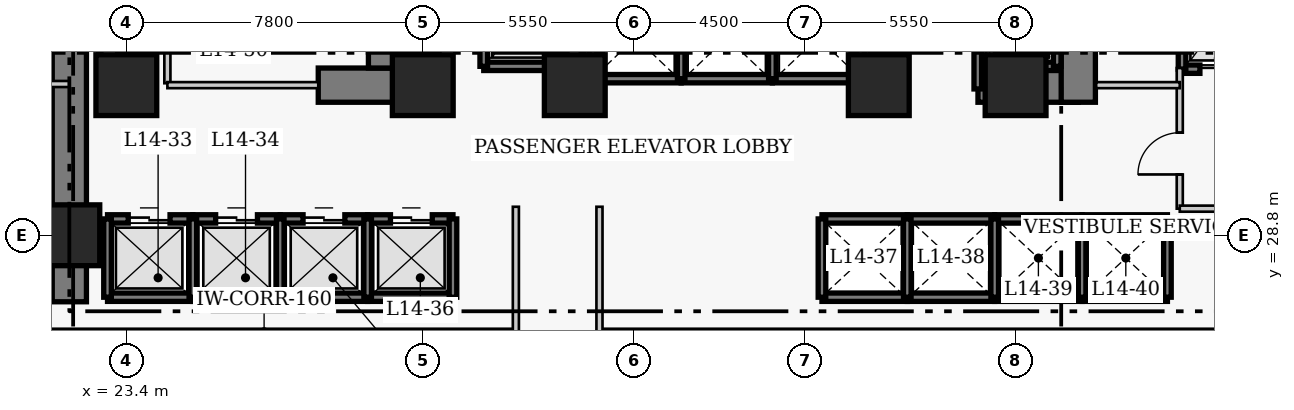
"""IFC4 building model, lengths in metres.
Left out: names, types, materials, properties, quantities, classifications, styles, units other than length and angle.
Written with IfcOpenShell. Run it as: python <this file> out.ifc"""

import sys

from ifc_helpers import new_model, si_unit, direction, frame, frame_2d, origin, origin_2d, place, context, subcontext, project, spatial, rectangle, extrude, element, fill, save


model = new_model("IFC4")
c1 = context("Model", 3, precision=1e-05, world=origin(), true_north=direction((0.0, 1.0)))
c2 = subcontext(c1, "Body", "Model", "MODEL_VIEW")
j1 = project(units=[si_unit("LENGTHUNIT", "METRE"), si_unit("PLANEANGLEUNIT", "RADIAN")], contexts=[c1])
p1 = place(None, origin())
s1 = spatial("IfcSite", under=j1, at=p1, CompositionType="ELEMENT")
p2 = place(p1, origin())
s2 = spatial("IfcBuilding", under=s1, at=p2, CompositionType="ELEMENT")
p3 = place(p2, frame((0.0, 0.0, 60.2)))
s3 = spatial("IfcBuildingStorey", under=s2, at=p3, CompositionType="ELEMENT", Elevation=60.2)
p4 = place(p3, frame((21.9, 27.05, 0.0), z_axis=(0.0, 0.0, 1.0), x_axis=(0.0, 1.0, 0.0)))
e1 = element("IfcWall", 1, at=p4, inside=s3, PredefinedType="SHEAR", context=c2, shape_type="SweptSolid", body=[
    extrude(rectangle(XDim=13.72, YDim=0.9, at=frame_2d((6.86, 0.0))), origin(), (0.0, 0.0, 1.0), 3.8),
])
p5 = place(p3, frame((28.45, 32.75, 0.0), z_axis=(0.0, 0.0, 1.0), x_axis=(1.0, 0.0, 0.0)))
e2 = element("IfcWall", 2, at=p5, inside=s3, PredefinedType="SHEAR", context=c2, shape_type="SweptSolid", body=[
    extrude(rectangle(XDim=2.4, YDim=0.9, at=frame_2d((1.2, 0.0))), origin(), (0.0, 0.0, 1.0), 3.8),
])
p6 = place(p3, frame((45.81, 32.75, 0.0), z_axis=(0.0, 0.0, 1.0), x_axis=(1.0, 0.0, 0.0)))
e3 = element("IfcWall", 3, at=p6, inside=s3, PredefinedType="SHEAR", context=c2, shape_type="SweptSolid", body=[
    extrude(rectangle(XDim=2.64, YDim=0.9, at=frame_2d((1.32, 0.0))), origin(), (0.0, 0.0, 1.0), 3.8),
])
p7 = place(p3, frame((30.22, 33.2, 0.0), z_axis=(0.0, 0.0, 1.0), x_axis=(0.0, 1.0, 0.0)))
e4 = element("IfcWall", 4, at=p7, inside=s3, PredefinedType="SHEAR", context=c2, shape_type="SweptSolid", body=[
    extrude(rectangle(XDim=7.12, YDim=0.9, at=frame_2d((3.56, 0.0))), origin(), (0.0, 0.0, 1.0), 3.8),
])
p8 = place(p3, frame((48.45, 32.3, 0.0), z_axis=(0.0, 0.0, 1.0), x_axis=(0.0, 1.0, 0.0)))
e5 = element("IfcWall", 5, at=p8, inside=s3, PredefinedType="SHEAR", context=c2, shape_type="SweptSolid", body=[
    extrude(rectangle(XDim=8.02, YDim=0.9, at=frame_2d((4.01, 0.0))), origin(), (0.0, 0.0, 1.0), 3.8),
])
p9 = place(p8, frame((5.9, 0.0, 0.0)))
e6 = element("IfcOpeningElement", 6, at=p9, cuts=e5, PredefinedType="OPENING", context=c2, shape_type="SweptSolid", body=[
    extrude(rectangle(XDim=1.1, YDim=2.15, at=frame_2d((0.55, 1.075))), frame((0.0, 0.46, 0.0), z_axis=(0.0, -1.0, 0.0), x_axis=(1.0, 0.0, 0.0)), (0.0, 0.0, 1.0), 0.92),
])
for number, where, z_axis, x_axis in (
    (7, (21.9, 28.8, 0.0), (0.0, 0.0, 1.0), (1.0, 0.0, 0.0)),
    (8, (23.4, 32.75, 0.0), (0.0, 0.0, 1.0), (1.0, 0.0, 0.0)),
    (9, (31.2, 32.75, 0.0), (0.0, 0.0, 1.0), (1.0, 0.0, 0.0)),
    (10, (35.2, 32.75, 0.0), (0.0, 0.0, 1.0), (1.0, 0.0, 0.0)),
    (11, (43.2, 32.75, 0.0), (0.0, 0.0, 1.0), (1.0, 0.0, 0.0)),
    (12, (46.8, 32.75, 0.0), (0.0, 0.0, 1.0), (1.0, 0.0, 0.0)),
):
    element("IfcColumn", number, at=place(p3, frame(where, z_axis=z_axis, x_axis=x_axis)), inside=s3, PredefinedType="COLUMN", context=c2, shape_type="SweptSolid", body=[
        extrude(rectangle(XDim=1.6, YDim=1.6, at=origin_2d()), origin(), (0.0, 0.0, 1.0), 3.8),
    ])
p10 = place(p3, frame((22.905, 29.23, 0.0), z_axis=(0.0, 0.0, 1.0), x_axis=(1.0, 0.0, 0.0)))
e13 = element("IfcWall", 13, at=p10, inside=s3, PredefinedType="SHEAR", context=c2, shape_type="SweptSolid", body=[
    extrude(rectangle(XDim=2.245, YDim=0.22, at=frame_2d((1.123, 0.0))), origin(), (0.0, 0.0, 1.0), 3.8),
])
p11 = place(p10, frame((0.545, 0.0, 0.0)))
e14 = element("IfcOpeningElement", 14, at=p11, cuts=e13, PredefinedType="OPENING", context=c2, shape_type="SweptSolid", body=[
    extrude(rectangle(XDim=1.1, YDim=2.15, at=frame_2d((0.55, 1.075))), frame((0.0, 0.12, 0.0), z_axis=(0.0, -1.0, 0.0), x_axis=(1.0, 0.0, 0.0)), (0.0, 0.0, 1.0), 0.24),
])
p12 = place(p3, frame((22.905, 27.17, 0.0), z_axis=(0.0, 0.0, 1.0), x_axis=(1.0, 0.0, 0.0)))
e15 = element("IfcWall", 15, at=p12, inside=s3, PredefinedType="SHEAR", context=c2, shape_type="SweptSolid", body=[
    extrude(rectangle(XDim=2.245, YDim=0.22, at=frame_2d((1.123, 0.0))), origin(), (0.0, 0.0, 1.0), 3.8),
])
p13 = place(p3, frame((22.905, 27.17, 0.0), z_axis=(0.0, 0.0, 1.0), x_axis=(0.0, 1.0, 0.0)))
e16 = element("IfcWall", 16, at=p13, inside=s3, PredefinedType="SHEAR", context=c2, shape_type="SweptSolid", body=[
    extrude(rectangle(XDim=2.06, YDim=0.2, at=frame_2d((1.03, 0.0))), origin(), (0.0, 0.0, 1.0), 3.8),
])
p14 = place(p3, frame((25.15, 29.23, 0.0), z_axis=(0.0, 0.0, 1.0), x_axis=(1.0, 0.0, 0.0)))
e17 = element("IfcWall", 17, at=p14, inside=s3, PredefinedType="SHEAR", context=c2, shape_type="SweptSolid", body=[
    extrude(rectangle(XDim=2.3, YDim=0.22, at=frame_2d((1.15, 0.0))), origin(), (0.0, 0.0, 1.0), 3.8),
])
p15 = place(p14, frame((0.6, 0.0, 0.0)))
e18 = element("IfcOpeningElement", 18, at=p15, cuts=e17, PredefinedType="OPENING", context=c2, shape_type="SweptSolid", body=[
    extrude(rectangle(XDim=1.1, YDim=2.15, at=frame_2d((0.55, 1.075))), frame((0.0, 0.12, 0.0), z_axis=(0.0, -1.0, 0.0), x_axis=(1.0, 0.0, 0.0)), (0.0, 0.0, 1.0), 0.24),
])
p16 = place(p3, frame((25.15, 27.17, 0.0), z_axis=(0.0, 0.0, 1.0), x_axis=(1.0, 0.0, 0.0)))
e19 = element("IfcWall", 19, at=p16, inside=s3, PredefinedType="SHEAR", context=c2, shape_type="SweptSolid", body=[
    extrude(rectangle(XDim=2.3, YDim=0.22, at=frame_2d((1.15, 0.0))), origin(), (0.0, 0.0, 1.0), 3.8),
])
p17 = place(p3, frame((25.15, 27.17, 0.0), z_axis=(0.0, 0.0, 1.0), x_axis=(0.0, 1.0, 0.0)))
e20 = element("IfcWall", 20, at=p17, inside=s3, PredefinedType="SHEAR", context=c2, shape_type="SweptSolid", body=[
    extrude(rectangle(XDim=2.06, YDim=0.2, at=frame_2d((1.03, 0.0))), origin(), (0.0, 0.0, 1.0), 3.8),
])
p18 = place(p3, frame((27.45, 29.23, 0.0), z_axis=(0.0, 0.0, 1.0), x_axis=(1.0, 0.0, 0.0)))
e21 = element("IfcWall", 21, at=p18, inside=s3, PredefinedType="SHEAR", context=c2, shape_type="SweptSolid", body=[
    extrude(rectangle(XDim=2.3, YDim=0.22, at=frame_2d((1.15, 0.0))), origin(), (0.0, 0.0, 1.0), 3.8),
])
p19 = place(p18, frame((0.6, 0.0, 0.0)))
e22 = element("IfcOpeningElement", 22, at=p19, cuts=e21, PredefinedType="OPENING", context=c2, shape_type="SweptSolid", body=[
    extrude(rectangle(XDim=1.1, YDim=2.15, at=frame_2d((0.55, 1.075))), frame((0.0, 0.12, 0.0), z_axis=(0.0, -1.0, 0.0), x_axis=(1.0, 0.0, 0.0)), (0.0, 0.0, 1.0), 0.24),
])
p20 = place(p3, frame((27.45, 27.17, 0.0), z_axis=(0.0, 0.0, 1.0), x_axis=(1.0, 0.0, 0.0)))
e23 = element("IfcWall", 23, at=p20, inside=s3, PredefinedType="SHEAR", context=c2, shape_type="SweptSolid", body=[
    extrude(rectangle(XDim=2.3, YDim=0.22, at=frame_2d((1.15, 0.0))), origin(), (0.0, 0.0, 1.0), 3.8),
])
p21 = place(p3, frame((27.45, 27.17, 0.0), z_axis=(0.0, 0.0, 1.0), x_axis=(0.0, 1.0, 0.0)))
e24 = element("IfcWall", 24, at=p21, inside=s3, PredefinedType="SHEAR", context=c2, shape_type="SweptSolid", body=[
    extrude(rectangle(XDim=2.06, YDim=0.2, at=frame_2d((1.03, 0.0))), origin(), (0.0, 0.0, 1.0), 3.8),
])
p22 = place(p3, frame((29.75, 29.23, 0.0), z_axis=(0.0, 0.0, 1.0), x_axis=(1.0, 0.0, 0.0)))
e25 = element("IfcWall", 25, at=p22, inside=s3, PredefinedType="SHEAR", context=c2, shape_type="SweptSolid", body=[
    extrude(rectangle(XDim=2.245, YDim=0.22, at=frame_2d((1.123, 0.0))), origin(), (0.0, 0.0, 1.0), 3.8),
])
p23 = place(p22, frame((0.6, 0.0, 0.0)))
e26 = element("IfcOpeningElement", 26, at=p23, cuts=e25, PredefinedType="OPENING", context=c2, shape_type="SweptSolid", body=[
    extrude(rectangle(XDim=1.1, YDim=2.15, at=frame_2d((0.55, 1.075))), frame((0.0, 0.12, 0.0), z_axis=(0.0, -1.0, 0.0), x_axis=(1.0, 0.0, 0.0)), (0.0, 0.0, 1.0), 0.24),
])
p24 = place(p3, frame((29.75, 27.17, 0.0), z_axis=(0.0, 0.0, 1.0), x_axis=(1.0, 0.0, 0.0)))
e27 = element("IfcWall", 27, at=p24, inside=s3, PredefinedType="SHEAR", context=c2, shape_type="SweptSolid", body=[
    extrude(rectangle(XDim=2.245, YDim=0.22, at=frame_2d((1.123, 0.0))), origin(), (0.0, 0.0, 1.0), 3.8),
])
for number, where, z_axis, x_axis in (
    (28, (29.75, 27.17, 0.0), (0.0, 0.0, 1.0), (0.0, 1.0, 0.0)),
    (29, (31.995, 27.17, 0.0), (0.0, 0.0, 1.0), (0.0, 1.0, 0.0)),
):
    element("IfcWall", number, at=place(p3, frame(where, z_axis=z_axis, x_axis=x_axis)), inside=s3, PredefinedType="SHEAR", context=c2, shape_type="SweptSolid", body=[
        extrude(rectangle(XDim=2.06, YDim=0.2, at=frame_2d((1.03, 0.0))), origin(), (0.0, 0.0, 1.0), 3.8),
    ])
for number, where, z_axis, x_axis in (
    (30, (41.705, 29.23, 0.0), (0.0, 0.0, 1.0), (1.0, 0.0, 0.0)),
    (31, (41.705, 27.17, 0.0), (0.0, 0.0, 1.0), (1.0, 0.0, 0.0)),
):
    element("IfcWall", number, at=place(p3, frame(where, z_axis=z_axis, x_axis=x_axis)), inside=s3, PredefinedType="SHEAR", context=c2, shape_type="SweptSolid", body=[
        extrude(rectangle(XDim=2.245, YDim=0.22, at=frame_2d((1.123, 0.0))), origin(), (0.0, 0.0, 1.0), 3.8),
    ])
p25 = place(p3, frame((41.705, 27.17, 0.0), z_axis=(0.0, 0.0, 1.0), x_axis=(0.0, 1.0, 0.0)))
e32 = element("IfcWall", 32, at=p25, inside=s3, PredefinedType="SHEAR", context=c2, shape_type="SweptSolid", body=[
    extrude(rectangle(XDim=2.06, YDim=0.2, at=frame_2d((1.03, 0.0))), origin(), (0.0, 0.0, 1.0), 3.8),
])
for number, where, z_axis, x_axis in (
    (33, (43.95, 29.23, 0.0), (0.0, 0.0, 1.0), (1.0, 0.0, 0.0)),
    (34, (43.95, 27.17, 0.0), (0.0, 0.0, 1.0), (1.0, 0.0, 0.0)),
):
    element("IfcWall", number, at=place(p3, frame(where, z_axis=z_axis, x_axis=x_axis)), inside=s3, PredefinedType="SHEAR", context=c2, shape_type="SweptSolid", body=[
        extrude(rectangle(XDim=2.3, YDim=0.22, at=frame_2d((1.15, 0.0))), origin(), (0.0, 0.0, 1.0), 3.8),
    ])
p26 = place(p3, frame((43.95, 27.17, 0.0), z_axis=(0.0, 0.0, 1.0), x_axis=(0.0, 1.0, 0.0)))
e35 = element("IfcWall", 35, at=p26, inside=s3, PredefinedType="SHEAR", context=c2, shape_type="SweptSolid", body=[
    extrude(rectangle(XDim=2.06, YDim=0.2, at=frame_2d((1.03, 0.0))), origin(), (0.0, 0.0, 1.0), 3.8),
])
for number, where, z_axis, x_axis in (
    (36, (46.25, 29.23, 0.0), (0.0, 0.0, 1.0), (1.0, 0.0, 0.0)),
    (37, (46.25, 27.17, 0.0), (0.0, 0.0, 1.0), (1.0, 0.0, 0.0)),
):
    element("IfcWall", number, at=place(p3, frame(where, z_axis=z_axis, x_axis=x_axis)), inside=s3, PredefinedType="SHEAR", context=c2, shape_type="SweptSolid", body=[
        extrude(rectangle(XDim=2.3, YDim=0.22, at=frame_2d((1.15, 0.0))), origin(), (0.0, 0.0, 1.0), 3.8),
    ])
p27 = place(p3, frame((46.25, 27.17, 0.0), z_axis=(0.0, 0.0, 1.0), x_axis=(0.0, 1.0, 0.0)))
e38 = element("IfcWall", 38, at=p27, inside=s3, PredefinedType="SHEAR", context=c2, shape_type="SweptSolid", body=[
    extrude(rectangle(XDim=2.06, YDim=0.2, at=frame_2d((1.03, 0.0))), origin(), (0.0, 0.0, 1.0), 3.8),
])
for number, where, z_axis, x_axis in (
    (39, (48.55, 29.23, 0.0), (0.0, 0.0, 1.0), (1.0, 0.0, 0.0)),
    (40, (48.55, 27.17, 0.0), (0.0, 0.0, 1.0), (1.0, 0.0, 0.0)),
):
    element("IfcWall", number, at=place(p3, frame(where, z_axis=z_axis, x_axis=x_axis)), inside=s3, PredefinedType="SHEAR", context=c2, shape_type="SweptSolid", body=[
        extrude(rectangle(XDim=2.245, YDim=0.22, at=frame_2d((1.123, 0.0))), origin(), (0.0, 0.0, 1.0), 3.8),
    ])
for number, where, z_axis, x_axis in (
    (41, (48.55, 27.17, 0.0), (0.0, 0.0, 1.0), (0.0, 1.0, 0.0)),
    (42, (50.795, 27.17, 0.0), (0.0, 0.0, 1.0), (0.0, 1.0, 0.0)),
):
    element("IfcWall", number, at=place(p3, frame(where, z_axis=z_axis, x_axis=x_axis)), inside=s3, PredefinedType="SHEAR", context=c2, shape_type="SweptSolid", body=[
        extrude(rectangle(XDim=2.06, YDim=0.2, at=frame_2d((1.03, 0.0))), origin(), (0.0, 0.0, 1.0), 3.8),
    ])
p28 = place(p3, frame((35.68, 32.92, 0.0), z_axis=(0.0, 0.0, 1.0), x_axis=(1.0, 0.0, 0.0)))
e43 = element("IfcWall", 43, at=p28, inside=s3, PredefinedType="SHEAR", context=c2, shape_type="SweptSolid", body=[
    extrude(rectangle(XDim=2.32, YDim=0.22, at=frame_2d((1.16, 0.0))), origin(), (0.0, 0.0, 1.0), 3.8),
])
p29 = place(p3, frame((35.68, 32.92, 0.0), z_axis=(0.0, 0.0, 1.0), x_axis=(0.0, 1.0, 0.0)))
e44 = element("IfcWall", 44, at=p29, inside=s3, PredefinedType="SHEAR", context=c2, shape_type="SweptSolid", body=[
    extrude(rectangle(XDim=2.16, YDim=0.2, at=frame_2d((1.08, 0.0))), origin(), (0.0, 0.0, 1.0), 3.8),
])
p30 = place(p3, frame((38.0, 32.92, 0.0), z_axis=(0.0, 0.0, 1.0), x_axis=(1.0, 0.0, 0.0)))
e45 = element("IfcWall", 45, at=p30, inside=s3, PredefinedType="SHEAR", context=c2, shape_type="SweptSolid", body=[
    extrude(rectangle(XDim=2.4, YDim=0.22, at=frame_2d((1.2, 0.0))), origin(), (0.0, 0.0, 1.0), 3.8),
])
p31 = place(p3, frame((38.0, 32.92, 0.0), z_axis=(0.0, 0.0, 1.0), x_axis=(0.0, 1.0, 0.0)))
e46 = element("IfcWall", 46, at=p31, inside=s3, PredefinedType="SHEAR", context=c2, shape_type="SweptSolid", body=[
    extrude(rectangle(XDim=2.16, YDim=0.2, at=frame_2d((1.08, 0.0))), origin(), (0.0, 0.0, 1.0), 3.8),
])
p32 = place(p3, frame((40.4, 32.92, 0.0), z_axis=(0.0, 0.0, 1.0), x_axis=(1.0, 0.0, 0.0)))
e47 = element("IfcWall", 47, at=p32, inside=s3, PredefinedType="SHEAR", context=c2, shape_type="SweptSolid", body=[
    extrude(rectangle(XDim=2.32, YDim=0.22, at=frame_2d((1.16, 0.0))), origin(), (0.0, 0.0, 1.0), 3.8),
])
for number, where, z_axis, x_axis in (
    (48, (40.4, 32.92, 0.0), (0.0, 0.0, 1.0), (0.0, 1.0, 0.0)),
    (49, (42.72, 32.92, 0.0), (0.0, 0.0, 1.0), (0.0, 1.0, 0.0)),
):
    element("IfcWall", number, at=place(p3, frame(where, z_axis=z_axis, x_axis=x_axis)), inside=s3, PredefinedType="SHEAR", context=c2, shape_type="SweptSolid", body=[
        extrude(rectangle(XDim=2.16, YDim=0.2, at=frame_2d((1.08, 0.0))), origin(), (0.0, 0.0, 1.0), 3.8),
    ])
p33 = place(p3, frame((51.18, 33.17, 0.0), z_axis=(0.0, 0.0, 1.0), x_axis=(1.0, 0.0, 0.0)))
e50 = element("IfcWall", 50, at=p33, inside=s3, PredefinedType="SHEAR", context=c2, shape_type="SweptSolid", body=[
    extrude(rectangle(XDim=2.42, YDim=0.22, at=frame_2d((1.21, 0.0))), origin(), (0.0, 0.0, 1.0), 3.8),
])
p34 = place(p33, frame((0.47, 0.0, 0.0)))
e51 = element("IfcOpeningElement", 51, at=p34, cuts=e50, PredefinedType="OPENING", context=c2, shape_type="SweptSolid", body=[
    extrude(rectangle(XDim=1.3, YDim=2.15, at=frame_2d((0.65, 1.075))), frame((0.0, 0.12, 0.0), z_axis=(0.0, -1.0, 0.0), x_axis=(1.0, 0.0, 0.0)), (0.0, 0.0, 1.0), 0.24),
])
p35 = place(p3, frame((51.18, 33.17, 0.0), z_axis=(0.0, 0.0, 1.0), x_axis=(0.0, 1.0, 0.0)))
e52 = element("IfcWall", 52, at=p35, inside=s3, PredefinedType="SHEAR", context=c2, shape_type="SweptSolid", body=[
    extrude(rectangle(XDim=2.86, YDim=0.2, at=frame_2d((1.43, 0.0))), origin(), (0.0, 0.0, 1.0), 3.8),
])
p36 = place(p3, frame((32.805, 33.245, 0.0), z_axis=(0.0, 0.0, 1.0), x_axis=(1.0, 0.0, 0.0)))
e53 = element("IfcWall", 53, at=p36, inside=s3, PredefinedType="SHEAR", context=c2, shape_type="SweptSolid", body=[
    extrude(rectangle(XDim=2.09, YDim=0.22, at=frame_2d((1.045, 0.0))), origin(), (0.0, 0.0, 1.0), 3.8),
])
for number, where, z_axis, x_axis in (
    (54, (32.805, 33.245, 0.0), (0.0, 0.0, 1.0), (0.0, 1.0, 0.0)),
    (55, (34.895, 33.245, 0.0), (0.0, 0.0, 1.0), (0.0, 1.0, 0.0)),
):
    element("IfcWall", number, at=place(p3, frame(where, z_axis=z_axis, x_axis=x_axis)), inside=s3, PredefinedType="SHEAR", context=c2, shape_type="SweptSolid", body=[
        extrude(rectangle(XDim=2.91, YDim=0.2, at=frame_2d((1.455, 0.0))), origin(), (0.0, 0.0, 1.0), 3.8),
    ])
p37 = place(p3, frame((45.805, 33.245, 0.0), z_axis=(0.0, 0.0, 1.0), x_axis=(1.0, 0.0, 0.0)))
e56 = element("IfcWall", 56, at=p37, inside=s3, PredefinedType="SHEAR", context=c2, shape_type="SweptSolid", body=[
    extrude(rectangle(XDim=2.09, YDim=0.22, at=frame_2d((1.045, 0.0))), origin(), (0.0, 0.0, 1.0), 3.8),
])
p38 = place(p3, frame((45.805, 32.65, 0.0), z_axis=(0.0, 0.0, 1.0), x_axis=(0.0, 1.0, 0.0)))
e57 = element("IfcWall", 57, at=p38, inside=s3, PredefinedType="SHEAR", context=c2, shape_type="SweptSolid", body=[
    extrude(rectangle(XDim=3.505, YDim=0.2, at=frame_2d((1.752, 0.0))), origin(), (0.0, 0.0, 1.0), 3.8),
])
p39 = place(p3, frame((47.895, 33.245, 0.0), z_axis=(0.0, 0.0, 1.0), x_axis=(0.0, 1.0, 0.0)))
e58 = element("IfcWall", 58, at=p39, inside=s3, PredefinedType="SHEAR", context=c2, shape_type="SweptSolid", body=[
    extrude(rectangle(XDim=2.91, YDim=0.2, at=frame_2d((1.455, 0.0))), origin(), (0.0, 0.0, 1.0), 3.8),
])
p40 = place(p3, frame((24.48, 32.8, 0.0), z_axis=(0.0, 0.0, 1.0), x_axis=(0.0, 1.0, 0.0)))
e59 = element("IfcWall", 59, at=p40, inside=s3, PredefinedType="PARTITIONING", context=c2, shape_type="SweptSolid", body=[
    extrude(rectangle(XDim=3.57, YDim=0.16, at=frame_2d((1.785, 0.0))), origin(), (0.0, 0.0, 1.0), 3.54),
])
p41 = place(p40, frame((1.604, 0.0, 0.0)))
e60 = element("IfcOpeningElement", 60, at=p41, cuts=e59, PredefinedType="OPENING", context=c2, shape_type="SweptSolid", body=[
    extrude(rectangle(XDim=0.9, YDim=2.1, at=frame_2d((0.45, 1.05))), frame((0.0, 0.09, 0.0), z_axis=(0.0, -1.0, 0.0), x_axis=(1.0, 0.0, 0.0)), (0.0, 0.0, 1.0), 0.18),
])
p42 = place(p3, frame((51.12, 29.5, 0.0), z_axis=(0.0, 0.0, 1.0), x_axis=(0.0, 1.0, 0.0)))
e61 = element("IfcWall", 61, at=p42, inside=s3, PredefinedType="PARTITIONING", context=c2, shape_type="SweptSolid", body=[
    extrude(rectangle(XDim=3.7, YDim=0.16, at=frame_2d((1.85, 0.0))), origin(), (0.0, 0.0, 1.0), 3.54),
])
p43 = place(p42, frame((0.9, 0.0, 0.0)))
e62 = element("IfcOpeningElement", 62, at=p43, cuts=e61, PredefinedType="OPENING", context=c2, shape_type="SweptSolid", body=[
    extrude(rectangle(XDim=1.1, YDim=2.15, at=frame_2d((0.55, 1.075))), frame((0.0, 0.09, 0.0), z_axis=(0.0, -1.0, 0.0), x_axis=(1.0, 0.0, 0.0)), (0.0, 0.0, 1.0), 0.18),
])
p44 = place(p3, frame((51.12, 29.5, 0.0), z_axis=(0.0, 0.0, 1.0), x_axis=(1.0, 0.0, 0.0)))
e63 = element("IfcWall", 63, at=p44, inside=s3, PredefinedType="PARTITIONING", context=c2, shape_type="SweptSolid", body=[
    extrude(rectangle(XDim=5.63, YDim=0.16, at=frame_2d((2.815, 0.0))), origin(), (0.0, 0.0, 1.0), 3.54),
])
p45 = place(p3, frame((24.48, 32.75, 0.0), z_axis=(0.0, 0.0, 1.0), x_axis=(1.0, 0.0, 0.0)))
e64 = element("IfcWall", 64, at=p45, inside=s3, PredefinedType="PARTITIONING", context=c2, shape_type="SweptSolid", body=[
    extrude(rectangle(XDim=3.97, YDim=0.16, at=frame_2d((1.985, 0.0))), origin(), (0.0, 0.0, 1.0), 3.54),
])
p46 = place(p3, frame((48.92, 32.75, 0.0), z_axis=(0.0, 0.0, 1.0), x_axis=(1.0, 0.0, 0.0)))
e65 = element("IfcWall", 65, at=p46, inside=s3, PredefinedType="PARTITIONING", context=c2, shape_type="SweptSolid", body=[
    extrude(rectangle(XDim=2.2, YDim=0.16, at=frame_2d((1.1, 0.0))), origin(), (0.0, 0.0, 1.0), 3.54),
])
p47 = place(p3, frame((20.4, 26.26, 0.0), z_axis=(0.0, 0.0, 1.0), x_axis=(1.0, 0.0, 0.0)))
e66 = element("IfcWall", 66, at=p47, inside=s3, PredefinedType="PARTITIONING", context=c2, shape_type="SweptSolid", body=[
    extrude(rectangle(XDim=13.25, YDim=0.16, at=frame_2d((6.625, 0.0))), origin(), (0.0, 0.0, 1.0), 3.54),
])
p48 = place(p3, frame((35.85, 26.26, 0.0), z_axis=(0.0, 0.0, 1.0), x_axis=(1.0, 0.0, 0.0)))
e67 = element("IfcWall", 67, at=p48, inside=s3, PredefinedType="PARTITIONING", context=c2, shape_type="SweptSolid", body=[
    extrude(rectangle(XDim=23.45, YDim=0.16, at=frame_2d((11.725, 0.0))), origin(), (0.0, 0.0, 1.0), 3.54),
])
for number, where, z_axis, x_axis in (
    (68, (33.65, 26.26, 0.0), (0.0, 0.0, 1.0), (0.0, 1.0, 0.0)),
    (69, (35.85, 26.26, 0.0), (0.0, 0.0, 1.0), (0.0, 1.0, 0.0)),
):
    element("IfcWall", number, at=place(p3, frame(where, z_axis=z_axis, x_axis=x_axis)), inside=s3, PredefinedType="PARTITIONING", context=c2, shape_type="SweptSolid", body=[
        extrude(rectangle(XDim=3.29, YDim=0.16, at=frame_2d((1.645, 0.0))), origin(), (0.0, 0.0, 1.0), 3.54),
    ])
p49 = place(p3, frame((20.46, 32.78, 0.0), z_axis=(0.0, 0.0, 1.0), x_axis=(1.0, 0.0, 0.0)))
e70 = element("IfcWall", 70, at=p49, inside=s3, PredefinedType="PARTITIONING", context=c2, shape_type="SweptSolid", body=[
    extrude(rectangle(XDim=1.44, YDim=0.16, at=frame_2d((0.72, 0.0))), origin(), (0.0, 0.0, 1.0), 3.54),
])
p50 = place(p11, origin())
e71 = element("IfcDoor", 71, at=p50, inside=s3, OperationType="DOUBLE_DOOR_SLIDING", PredefinedType="DOOR", context=c2, shape_type="SweptSolid", body=[
    extrude(rectangle(XDim=1.1, YDim=2.15, at=frame_2d((0.55, 1.075))), frame((0.0, 0.025, 0.0), z_axis=(0.0, -1.0, 0.0), x_axis=(1.0, 0.0, 0.0)), (0.0, 0.0, 1.0), 0.05),
])
fill(e14, e71)
p51 = place(p15, origin())
e72 = element("IfcDoor", 72, at=p51, inside=s3, OperationType="DOUBLE_DOOR_SLIDING", PredefinedType="DOOR", context=c2, shape_type="SweptSolid", body=[
    extrude(rectangle(XDim=1.1, YDim=2.15, at=frame_2d((0.55, 1.075))), frame((0.0, 0.025, 0.0), z_axis=(0.0, -1.0, 0.0), x_axis=(1.0, 0.0, 0.0)), (0.0, 0.0, 1.0), 0.05),
])
fill(e18, e72)
p52 = place(p19, origin())
e73 = element("IfcDoor", 73, at=p52, inside=s3, OperationType="DOUBLE_DOOR_SLIDING", PredefinedType="DOOR", context=c2, shape_type="SweptSolid", body=[
    extrude(rectangle(XDim=1.1, YDim=2.15, at=frame_2d((0.55, 1.075))), frame((0.0, 0.025, 0.0), z_axis=(0.0, -1.0, 0.0), x_axis=(1.0, 0.0, 0.0)), (0.0, 0.0, 1.0), 0.05),
])
fill(e22, e73)
p53 = place(p23, origin())
e74 = element("IfcDoor", 74, at=p53, inside=s3, OperationType="DOUBLE_DOOR_SLIDING", PredefinedType="DOOR", context=c2, shape_type="SweptSolid", body=[
    extrude(rectangle(XDim=1.1, YDim=2.15, at=frame_2d((0.55, 1.075))), frame((0.0, 0.025, 0.0), z_axis=(0.0, -1.0, 0.0), x_axis=(1.0, 0.0, 0.0)), (0.0, 0.0, 1.0), 0.05),
])
fill(e26, e74)
p54 = place(p34, origin())
e75 = element("IfcDoor", 75, at=p54, inside=s3, OperationType="DOUBLE_DOOR_SLIDING", PredefinedType="DOOR", context=c2, shape_type="SweptSolid", body=[
    extrude(rectangle(XDim=1.3, YDim=2.15, at=frame_2d((0.65, 1.075))), frame((0.0, 0.025, 0.0), z_axis=(0.0, -1.0, 0.0), x_axis=(1.0, 0.0, 0.0)), (0.0, 0.0, 1.0), 0.05),
])
fill(e51, e75)
p55 = place(p43, origin())
e76 = element("IfcDoor", 76, at=p55, inside=s3, OperationType="SINGLE_SWING_LEFT", PredefinedType="DOOR", context=c2, shape_type="SweptSolid", body=[
    extrude(rectangle(XDim=1.1, YDim=2.15, at=frame_2d((0.55, 1.075))), frame((0.0, 0.025, 0.0), z_axis=(0.0, -1.0, 0.0), x_axis=(1.0, 0.0, 0.0)), (0.0, 0.0, 1.0), 0.05),
])
fill(e62, e76)
save(model, sys.argv[1])
